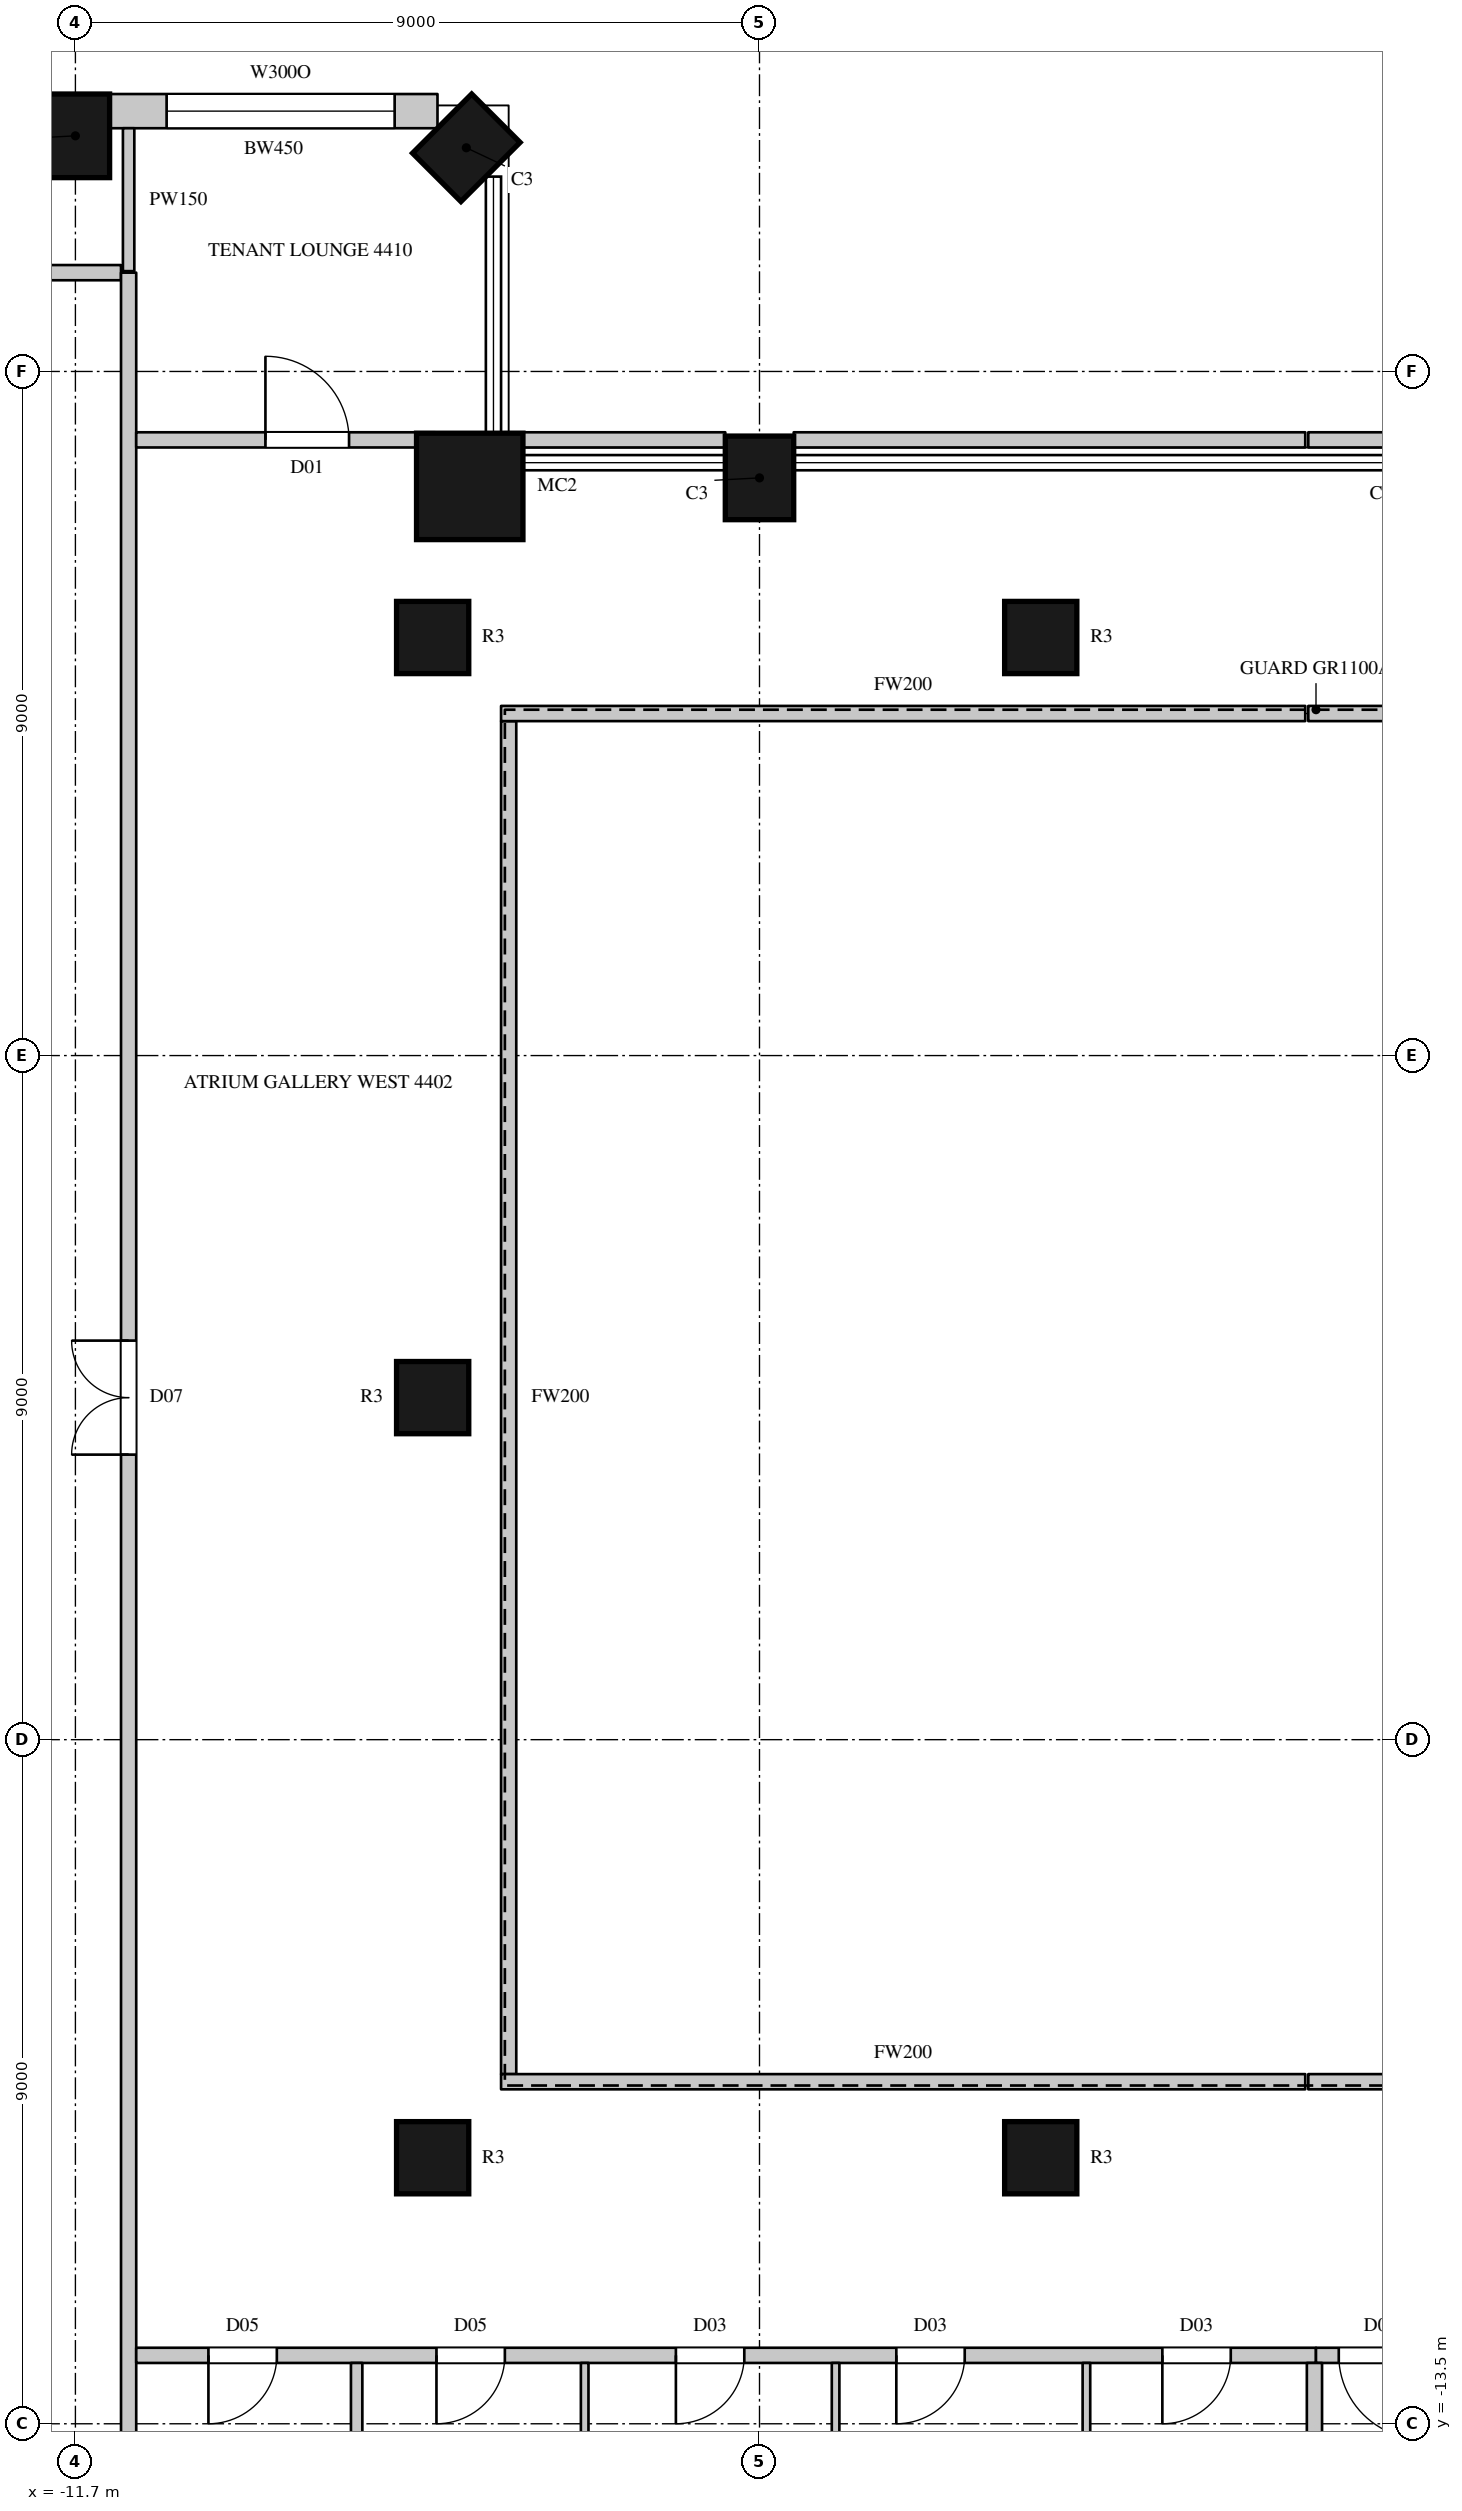
"""IFC4 building model, lengths in metres.
Left out: names, types, materials, properties, quantities, classifications, styles, units other than length and angle.
Written with IfcOpenShell. Run it as: python <this file> out.ifc"""

import sys

from ifc_helpers import new_model, si_unit, direction, frame, frame_2d, origin, origin_2d, place, context, subcontext, project, spatial, rectangle, circle, extrude, element, fill, save


model = new_model("IFC4")
c1 = context("Model", 3, precision=1e-05, world=origin(), true_north=direction((0.0, 1.0)))
c2 = subcontext(c1, "Body", "Model", "MODEL_VIEW")
j1 = project(units=[si_unit("LENGTHUNIT", "METRE"), si_unit("PLANEANGLEUNIT", "RADIAN")], contexts=[c1])
p1 = place(None, origin())
s1 = spatial("IfcSite", under=j1, at=p1, CompositionType="ELEMENT")
p2 = place(p1, origin())
s2 = spatial("IfcBuilding", under=s1, at=p2, CompositionType="ELEMENT")
p3 = place(p2, frame((0.0, 0.0, 201.5)))
s3 = spatial("IfcBuildingStorey", under=s2, at=p3, CompositionType="ELEMENT", Elevation=201.5)
p4 = place(p3, frame((-2.7, 12.1, 0.0), z_axis=(0.0, 0.0, 1.0), x_axis=(-1.0, 0.0, 0.0)))
e1 = element("IfcColumn", 1, at=p4, inside=s3, PredefinedType="COLUMN", context=c2, shape_type="SweptSolid", body=[
    extrude(rectangle(XDim=0.9, YDim=1.1, at=origin_2d()), origin(), (0.0, 0.0, 1.0), 4.1),
])
p5 = place(p3, frame((-6.512, 11.988, 0.0), z_axis=(0.0, 0.0, 1.0), x_axis=(1.0, 0.0, 0.0)))
e2 = element("IfcColumn", 2, at=p5, inside=s3, PredefinedType="COLUMN", context=c2, shape_type="SweptSolid", body=[
    extrude(circle(Radius=0.7, at=origin_2d()), origin(), (0.0, 0.0, 1.0), 4.1),
])
for number, where, z_axis, x_axis in (
    (3, (-6.557, 16.443, 0.0), (0.0, 0.0, 1.0), (-0.707, 0.707, 0.0)),
    (4, (-11.7, 16.6, 0.0), (0.0, 0.0, 1.0), (-1.0, 0.0, 0.0)),
):
    element("IfcColumn", number, at=place(p3, frame(where, z_axis=z_axis, x_axis=x_axis)), inside=s3, PredefinedType="COLUMN", context=c2, shape_type="SweptSolid", body=[
        extrude(rectangle(XDim=0.9, YDim=1.1, at=origin_2d()), origin(), (0.0, 0.0, 1.0), 4.1),
    ])
for number, where, z_axis, x_axis in (
    (5, (-7.0, -10.0, 0.0), (0.0, 0.0, 1.0), (1.0, 0.0, 0.0)),
    (6, (-7.0, 0.0, 0.0), (0.0, 0.0, 1.0), (1.0, 0.0, 0.0)),
    (7, (-7.0, 10.0, 0.0), (0.0, 0.0, 1.0), (1.0, 0.0, 0.0)),
    (8, (1.0, -10.0, 0.0), (0.0, 0.0, 1.0), (1.0, 0.0, 0.0)),
    (9, (1.0, 10.0, 0.0), (0.0, 0.0, 1.0), (1.0, 0.0, 0.0)),
):
    element("IfcColumn", number, at=place(p3, frame(where, z_axis=z_axis, x_axis=x_axis)), inside=s3, PredefinedType="COLUMN", context=c2, shape_type="SweptSolid", body=[
        extrude(circle(Radius=0.475, at=origin_2d()), origin(), (0.0, 0.0, 1.0), 4.1),
    ])
p6 = place(p3, frame((-6.936, 16.925, 0.0), z_axis=(0.0, 0.0, 1.0), x_axis=(-1.0, 0.0, 0.0)))
e10 = element("IfcWall", 10, at=p6, inside=s3, PredefinedType="SOLIDWALL", context=c2, shape_type="SweptSolid", body=[
    extrude(rectangle(XDim=4.314, YDim=0.45, at=frame_2d((2.157, 0.0))), origin(), (0.0, 0.0, 1.0), 3.8),
])
p7 = place(p6, frame((0.564, 0.0, 1.05)))
e11 = element("IfcOpeningElement", 11, at=p7, cuts=e10, PredefinedType="OPENING", context=c2, shape_type="SweptSolid", body=[
    extrude(rectangle(XDim=3.0, YDim=2.4, at=frame_2d((1.5, 1.2))), frame((0.0, 0.235, 0.0), z_axis=(0.0, -1.0, 0.0), x_axis=(1.0, 0.0, 0.0)), (0.0, 0.0, 1.0), 0.47),
])
p8 = place(p3, frame((-13.97, 14.8, 0.0), z_axis=(0.0, 0.0, 1.0), x_axis=(1.0, 0.0, 0.0)))
e12 = element("IfcWall", 12, at=p8, inside=s3, PredefinedType="PARTITIONING", context=c2, shape_type="SweptSolid", body=[
    extrude(rectangle(XDim=2.87, YDim=0.2, at=frame_2d((1.435, 0.0))), origin(), (0.0, 0.0, 1.0), 3.8),
])
p9 = place(p3, frame((-11.0, -14.8, 0.0), z_axis=(0.0, 0.0, 1.0), x_axis=(0.0, 1.0, 0.0)))
e13 = element("IfcWall", 13, at=p9, inside=s3, PredefinedType="PARTITIONING", context=c2, shape_type="SweptSolid", body=[
    extrude(rectangle(XDim=29.6, YDim=0.2, at=frame_2d((14.8, 0.0))), origin(), (0.0, 0.0, 1.0), 3.8),
])
p10 = place(p9, frame((14.05, 0.0, 0.0)))
e14 = element("IfcOpeningElement", 14, at=p10, cuts=e13, PredefinedType="OPENING", context=c2, shape_type="SweptSolid", body=[
    extrude(rectangle(XDim=1.5, YDim=2.4, at=frame_2d((0.75, 1.2))), frame((0.0, 0.11, 0.0), z_axis=(0.0, -1.0, 0.0), x_axis=(1.0, 0.0, 0.0)), (0.0, 0.0, 1.0), 0.22),
])
p11 = place(p3, frame((-10.9, -12.6, 0.0), z_axis=(0.0, 0.0, 1.0), x_axis=(1.0, 0.0, 0.0)))
e15 = element("IfcWall", 15, at=p11, inside=s3, PredefinedType="PARTITIONING", context=c2, shape_type="SweptSolid", body=[
    extrude(rectangle(XDim=15.521, YDim=0.2, at=frame_2d((7.76, 0.0))), origin(), (0.0, 0.0, 1.0), 3.8),
])
p12 = place(p11, frame((0.95, 0.0, 0.0)))
e16 = element("IfcOpeningElement", 16, at=p12, cuts=e15, PredefinedType="OPENING", context=c2, shape_type="SweptSolid", body=[
    extrude(rectangle(XDim=0.9, YDim=2.2, at=frame_2d((0.45, 1.1))), frame((0.0, 0.11, 0.0), z_axis=(0.0, -1.0, 0.0), x_axis=(1.0, 0.0, 0.0)), (0.0, 0.0, 1.0), 0.22),
])
p13 = place(p11, frame((3.95, 0.0, 0.0)))
e17 = element("IfcOpeningElement", 17, at=p13, cuts=e15, PredefinedType="OPENING", context=c2, shape_type="SweptSolid", body=[
    extrude(rectangle(XDim=0.9, YDim=2.2, at=frame_2d((0.45, 1.1))), frame((0.0, 0.11, 0.0), z_axis=(0.0, -1.0, 0.0), x_axis=(1.0, 0.0, 0.0)), (0.0, 0.0, 1.0), 0.22),
])
p14 = place(p11, frame((7.1, 0.0, 0.0)))
e18 = element("IfcOpeningElement", 18, at=p14, cuts=e15, PredefinedType="OPENING", context=c2, shape_type="SweptSolid", body=[
    extrude(rectangle(XDim=0.9, YDim=2.2, at=frame_2d((0.45, 1.1))), frame((0.0, 0.11, 0.0), z_axis=(0.0, -1.0, 0.0), x_axis=(1.0, 0.0, 0.0)), (0.0, 0.0, 1.0), 0.22),
])
p15 = place(p11, frame((10.0, 0.0, 0.0)))
e19 = element("IfcOpeningElement", 19, at=p15, cuts=e15, PredefinedType="OPENING", context=c2, shape_type="SweptSolid", body=[
    extrude(rectangle(XDim=0.9, YDim=2.2, at=frame_2d((0.45, 1.1))), frame((0.0, 0.11, 0.0), z_axis=(0.0, -1.0, 0.0), x_axis=(1.0, 0.0, 0.0)), (0.0, 0.0, 1.0), 0.22),
])
p16 = place(p11, frame((13.5, 0.0, 0.0)))
e20 = element("IfcOpeningElement", 20, at=p16, cuts=e15, PredefinedType="OPENING", context=c2, shape_type="SweptSolid", body=[
    extrude(rectangle(XDim=0.9, YDim=2.2, at=frame_2d((0.45, 1.1))), frame((0.0, 0.11, 0.0), z_axis=(0.0, -1.0, 0.0), x_axis=(1.0, 0.0, 0.0)), (0.0, 0.0, 1.0), 0.22),
])
p17 = place(p3, frame((-10.9, 12.6, 0.0), z_axis=(0.0, 0.0, 1.0), x_axis=(1.0, 0.0, 0.0)))
e21 = element("IfcWall", 21, at=p17, inside=s3, PredefinedType="PARTITIONING", context=c2, shape_type="SweptSolid", body=[
    extrude(rectangle(XDim=3.935, YDim=0.2, at=frame_2d((1.968, 0.0))), origin(), (0.0, 0.0, 1.0), 3.8),
])
p18 = place(p17, frame((1.7, 0.0, 0.0)))
e22 = element("IfcOpeningElement", 22, at=p18, cuts=e21, PredefinedType="OPENING", context=c2, shape_type="SweptSolid", body=[
    extrude(rectangle(XDim=1.1, YDim=2.4, at=frame_2d((0.55, 1.2))), frame((0.0, 0.11, 0.0), z_axis=(0.0, -1.0, 0.0), x_axis=(1.0, 0.0, 0.0)), (0.0, 0.0, 1.0), 0.22),
])
p19 = place(p3, frame((-6.06, 12.6, 0.0), z_axis=(0.0, 0.0, 1.0), x_axis=(1.0, 0.0, 0.0)))
e23 = element("IfcWall", 23, at=p19, inside=s3, PredefinedType="PARTITIONING", context=c2, shape_type="SweptSolid", body=[
    extrude(rectangle(XDim=2.91, YDim=0.2, at=frame_2d((1.455, 0.0))), origin(), (0.0, 0.0, 1.0), 3.8),
])
p20 = place(p3, frame((-2.25, 12.6, 0.0), z_axis=(0.0, 0.0, 1.0), x_axis=(1.0, 0.0, 0.0)))
e24 = element("IfcWall", 24, at=p20, inside=s3, PredefinedType="PARTITIONING", context=c2, shape_type="SweptSolid", body=[
    extrude(rectangle(XDim=6.73, YDim=0.2, at=frame_2d((3.365, 0.0))), origin(), (0.0, 0.0, 1.0), 3.8),
])
p21 = place(p3, frame((-6.0, -8.9, 0.0), z_axis=(0.0, 0.0, 1.0), x_axis=(0.0, 1.0, 0.0)))
e25 = element("IfcWall", 25, at=p21, inside=s3, PredefinedType="PARTITIONING", context=c2, shape_type="SweptSolid", body=[
    extrude(rectangle(XDim=17.8, YDim=0.2, at=frame_2d((8.9, 0.0))), origin(), (0.0, 0.0, 1.0), 3.8),
])
for number, where, z_axis, x_axis in (
    (26, (-6.1, -9.0, 0.0), (0.0, 0.0, 1.0), (1.0, 0.0, 0.0)),
    (27, (-6.1, 9.0, 0.0), (0.0, 0.0, 1.0), (1.0, 0.0, 0.0)),
):
    element("IfcWall", number, at=place(p3, frame(where, z_axis=z_axis, x_axis=x_axis)), inside=s3, PredefinedType="PARTITIONING", context=c2, shape_type="SweptSolid", body=[
        extrude(rectangle(XDim=10.58, YDim=0.2, at=frame_2d((5.29, 0.0))), origin(), (0.0, 0.0, 1.0), 3.8),
    ])
for number, where, z_axis, x_axis in (
    (28, (4.52, -9.0, 0.0), (0.0, 0.0, 1.0), (1.0, 0.0, 0.0)),
    (29, (4.52, 9.0, 0.0), (0.0, 0.0, 1.0), (1.0, 0.0, 0.0)),
):
    element("IfcWall", number, at=place(p3, frame(where, z_axis=z_axis, x_axis=x_axis)), inside=s3, PredefinedType="PARTITIONING", context=c2, shape_type="SweptSolid", body=[
        extrude(rectangle(XDim=3.58, YDim=0.2, at=frame_2d((1.79, 0.0))), origin(), (0.0, 0.0, 1.0), 3.8),
    ])
p22 = place(p3, frame((4.52, 12.6, 0.0), z_axis=(0.0, 0.0, 1.0), x_axis=(1.0, 0.0, 0.0)))
e30 = element("IfcWall", 30, at=p22, inside=s3, PredefinedType="PARTITIONING", context=c2, shape_type="SweptSolid", body=[
    extrude(rectangle(XDim=1.33, YDim=0.2, at=frame_2d((0.665, 0.0))), origin(), (0.0, 0.0, 1.0), 3.8),
])
p23 = place(p3, frame((-11.0, 14.82, 0.0), z_axis=(0.0, 0.0, 1.0), x_axis=(0.0, 1.0, 0.0)))
e31 = element("IfcWall", 31, at=p23, inside=s3, PredefinedType="PARTITIONING", context=c2, shape_type="SweptSolid", body=[
    extrude(rectangle(XDim=1.88, YDim=0.15, at=frame_2d((0.94, 0.0))), origin(), (0.0, 0.0, 1.0), 3.8),
])
p24 = place(p3, frame((-8.0, -16.7, 0.0), z_axis=(0.0, 0.0, 1.0), x_axis=(0.0, 1.0, 0.0)))
e32 = element("IfcWall", 32, at=p24, inside=s3, PredefinedType="PARTITIONING", context=c2, shape_type="SweptSolid", body=[
    extrude(rectangle(XDim=4.0, YDim=0.15, at=frame_2d((2.0, 0.0))), origin(), (0.0, 0.0, 1.0), 3.8),
])
p25 = place(p3, frame((4.621, -12.6, 0.0), z_axis=(0.0, 0.0, 1.0), x_axis=(1.0, 0.0, 0.0)))
e33 = element("IfcWall", 33, at=p25, inside=s3, PredefinedType="PARTITIONING", context=c2, shape_type="SweptSolid", body=[
    extrude(rectangle(XDim=1.659, YDim=0.2, at=frame_2d((0.83, 0.0))), origin(), (0.0, 0.0, 1.0), 3.8),
])
p26 = place(p25, frame((0.3, 0.0, 0.0)))
e34 = element("IfcOpeningElement", 34, at=p26, cuts=e33, PredefinedType="OPENING", context=c2, shape_type="SweptSolid", body=[
    extrude(rectangle(XDim=1.1, YDim=2.4, at=frame_2d((0.55, 1.2))), frame((0.0, 0.11, 0.0), z_axis=(0.0, -1.0, 0.0), x_axis=(1.0, 0.0, 0.0)), (0.0, 0.0, 1.0), 0.22),
])
p27 = place(p3, frame((4.601, -16.7, 0.0), z_axis=(0.0, 0.0, 1.0), x_axis=(0.0, 1.0, 0.0)))
e35 = element("IfcWall", 35, at=p27, inside=s3, PredefinedType="PARTITIONING", context=c2, shape_type="SweptSolid", body=[
    extrude(rectangle(XDim=4.0, YDim=0.2, at=frame_2d((2.0, 0.0))), origin(), (0.0, 0.0, 1.0), 3.8),
])
for number, where, z_axis, x_axis in (
    (36, (-5.0, -16.7, 0.0), (0.0, 0.0, 1.0), (0.0, 1.0, 0.0)),
    (37, (-1.699, -16.7, 0.0), (0.0, 0.0, 1.0), (0.0, 1.0, 0.0)),
):
    element("IfcWall", number, at=place(p3, frame(where, z_axis=z_axis, x_axis=x_axis)), inside=s3, PredefinedType="PARTITIONING", context=c2, shape_type="SweptSolid", body=[
        extrude(rectangle(XDim=4.0, YDim=0.1, at=frame_2d((2.0, 0.0))), origin(), (0.0, 0.0, 1.0), 3.8),
    ])
p28 = place(p3, frame((1.601, -16.7, 0.0), z_axis=(0.0, 0.0, 1.0), x_axis=(0.0, 1.0, 0.0)))
e38 = element("IfcWall", 38, at=p28, inside=s3, PredefinedType="PARTITIONING", context=c2, shape_type="SweptSolid", body=[
    extrude(rectangle(XDim=4.0, YDim=0.1, at=frame_2d((2.0, 0.0))), origin(), (0.0, 0.0, 1.0), 3.15),
])
p29 = place(p7, origin())
e39 = element("IfcWindow", 39, at=p29, inside=s3, PartitioningType="SINGLE_PANEL", PredefinedType="WINDOW", context=c2, shape_type="SweptSolid", body=[
    extrude(rectangle(XDim=3.0, YDim=2.4, at=frame_2d((1.5, 1.2))), frame((0.0, 0.135, 0.0), z_axis=(0.0, -1.0, 0.0), x_axis=(1.0, 0.0, 0.0)), (0.0, 0.0, 1.0), 0.06),
])
fill(e11, e39)
p30 = place(p10, origin())
e40 = element("IfcDoor", 40, at=p30, inside=s3, OperationType="DOUBLE_DOOR_SINGLE_SWING", PredefinedType="DOOR", context=c2, shape_type="SweptSolid", body=[
    extrude(rectangle(XDim=1.5, YDim=2.4, at=frame_2d((0.75, 1.2))), frame((0.0, 0.025, 0.0), z_axis=(0.0, -1.0, 0.0), x_axis=(1.0, 0.0, 0.0)), (0.0, 0.0, 1.0), 0.05),
])
fill(e14, e40)
p31 = place(p12, origin())
e41 = element("IfcDoor", 41, at=p31, inside=s3, OperationType="SINGLE_SWING_RIGHT", PredefinedType="DOOR", context=c2, shape_type="SweptSolid", body=[
    extrude(rectangle(XDim=0.9, YDim=2.2, at=frame_2d((0.45, 1.1))), frame((0.0, 0.025, 0.0), z_axis=(0.0, -1.0, 0.0), x_axis=(1.0, 0.0, 0.0)), (0.0, 0.0, 1.0), 0.05),
])
fill(e16, e41)
p32 = place(p13, origin())
e42 = element("IfcDoor", 42, at=p32, inside=s3, OperationType="SINGLE_SWING_RIGHT", PredefinedType="DOOR", context=c2, shape_type="SweptSolid", body=[
    extrude(rectangle(XDim=0.9, YDim=2.2, at=frame_2d((0.45, 1.1))), frame((0.0, 0.025, 0.0), z_axis=(0.0, -1.0, 0.0), x_axis=(1.0, 0.0, 0.0)), (0.0, 0.0, 1.0), 0.05),
])
fill(e17, e42)
p33 = place(p14, origin())
e43 = element("IfcDoor", 43, at=p33, inside=s3, OperationType="SINGLE_SWING_RIGHT", PredefinedType="DOOR", context=c2, shape_type="SweptSolid", body=[
    extrude(rectangle(XDim=0.9, YDim=2.2, at=frame_2d((0.45, 1.1))), frame((0.0, 0.025, 0.0), z_axis=(0.0, -1.0, 0.0), x_axis=(1.0, 0.0, 0.0)), (0.0, 0.0, 1.0), 0.05),
])
fill(e18, e43)
p34 = place(p15, origin())
e44 = element("IfcDoor", 44, at=p34, inside=s3, OperationType="SINGLE_SWING_RIGHT", PredefinedType="DOOR", context=c2, shape_type="SweptSolid", body=[
    extrude(rectangle(XDim=0.9, YDim=2.2, at=frame_2d((0.45, 1.1))), frame((0.0, 0.025, 0.0), z_axis=(0.0, -1.0, 0.0), x_axis=(1.0, 0.0, 0.0)), (0.0, 0.0, 1.0), 0.05),
])
fill(e19, e44)
p35 = place(p16, origin())
e45 = element("IfcDoor", 45, at=p35, inside=s3, OperationType="SINGLE_SWING_RIGHT", PredefinedType="DOOR", context=c2, shape_type="SweptSolid", body=[
    extrude(rectangle(XDim=0.9, YDim=2.2, at=frame_2d((0.45, 1.1))), frame((0.0, 0.025, 0.0), z_axis=(0.0, -1.0, 0.0), x_axis=(1.0, 0.0, 0.0)), (0.0, 0.0, 1.0), 0.05),
])
fill(e20, e45)
p36 = place(p18, origin())
e46 = element("IfcDoor", 46, at=p36, inside=s3, OperationType="SINGLE_SWING_LEFT", PredefinedType="DOOR", context=c2, shape_type="SweptSolid", body=[
    extrude(rectangle(XDim=1.1, YDim=2.4, at=frame_2d((0.55, 1.2))), frame((0.0, 0.025, 0.0), z_axis=(0.0, -1.0, 0.0), x_axis=(1.0, 0.0, 0.0)), (0.0, 0.0, 1.0), 0.05),
])
fill(e22, e46)
p37 = place(p26, origin())
e47 = element("IfcDoor", 47, at=p37, inside=s3, OperationType="SINGLE_SWING_LEFT", PredefinedType="DOOR", context=c2, shape_type="SweptSolid", body=[
    extrude(rectangle(XDim=1.1, YDim=2.4, at=frame_2d((0.55, 1.2))), frame((0.0, 0.025, 0.0), z_axis=(0.0, -1.0, 0.0), x_axis=(1.0, 0.0, 0.0)), (0.0, 0.0, 1.0), 0.05),
])
fill(e34, e47)
save(model, sys.argv[1])
